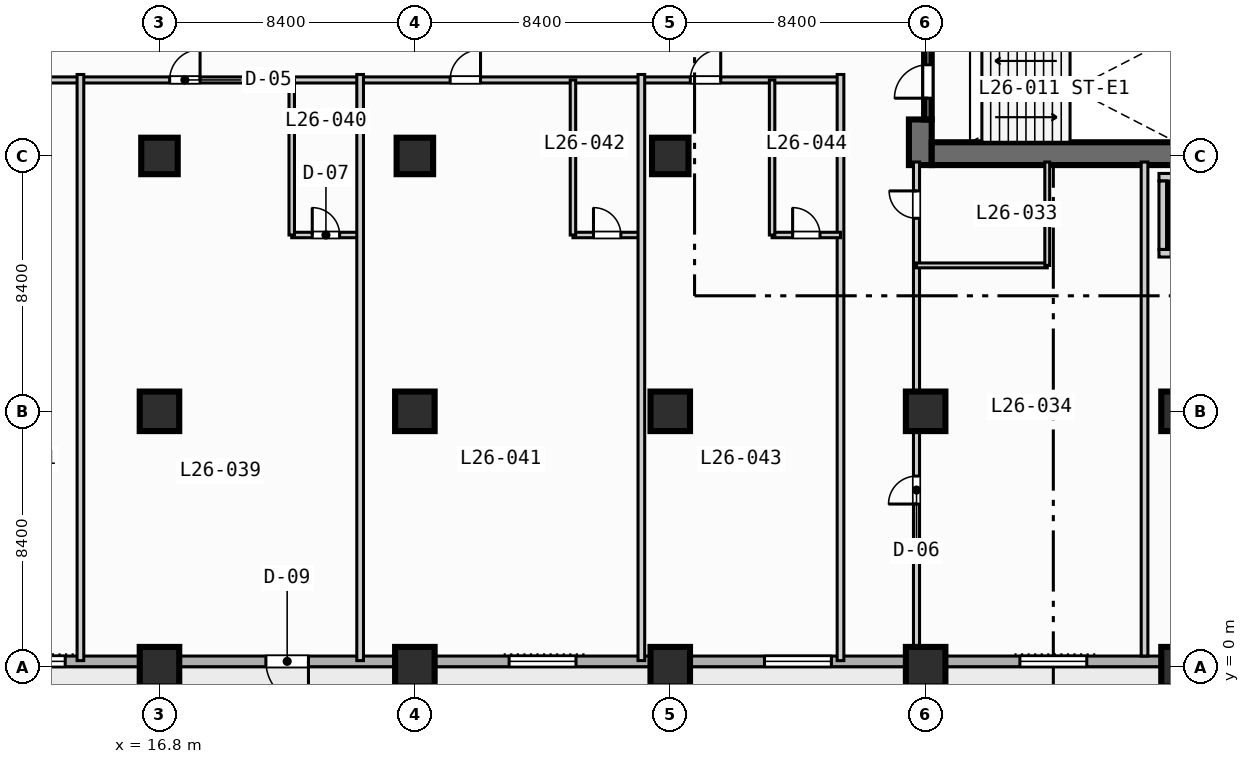
"""IFC4 building model, lengths in metres.
Left out: names, types, materials, properties, quantities, classifications, styles, units other than length and angle.
Written with IfcOpenShell. Run it as: python <this file> out.ifc"""

import sys

from ifc_helpers import new_model, si_unit, direction, frame, frame_2d, origin, origin_2d, place, context, subcontext, project, spatial, rectangle, extrude, element, fill, save


model = new_model("IFC4")
c1 = context("Model", 3, precision=1e-05, world=origin(), true_north=direction((0.0, 1.0)))
c2 = subcontext(c1, "Body", "Model", "MODEL_VIEW")
j1 = project(units=[si_unit("LENGTHUNIT", "METRE"), si_unit("PLANEANGLEUNIT", "RADIAN")], contexts=[c1])
p1 = place(None, origin())
s1 = spatial("IfcSite", under=j1, at=p1, CompositionType="ELEMENT")
p2 = place(p1, origin())
s2 = spatial("IfcBuilding", under=s1, at=p2, CompositionType="ELEMENT")
p3 = place(p2, frame((0.0, 0.0, 111.4)))
s3 = spatial("IfcBuildingStorey", under=s2, at=p3, CompositionType="ELEMENT", Elevation=111.4)
p4 = place(p3, frame((41.825, 16.5, 0.0), z_axis=(0.0, 0.0, 1.0), x_axis=(0.0, 1.0, 0.0)))
e1 = element("IfcWall", 1, at=p4, inside=s3, PredefinedType="SHEAR", context=c2, shape_type="SweptSolid", body=[
    extrude(rectangle(XDim=1.5, YDim=0.75, at=frame_2d((0.75, 0.0))), origin(), (0.0, 0.0, 1.0), 3.55),
])
p5 = place(p3, frame((42.2, 16.875, 0.0), z_axis=(0.0, 0.0, 1.0), x_axis=(1.0, 0.0, 0.0)))
e2 = element("IfcWall", 2, at=p5, inside=s3, PredefinedType="SHEAR", context=c2, shape_type="SweptSolid", body=[
    extrude(rectangle(XDim=16.35, YDim=0.75, at=frame_2d((8.175, 0.0))), origin(), (0.0, 0.0, 1.0), 3.55),
])
for number, where, z_axis, x_axis in (
    (3, (16.8, 0.0, 0.0), (0.0, 0.0, 1.0), (1.0, 0.0, 0.0)),
    (4, (16.8, 8.4, 0.0), (0.0, 0.0, 1.0), (1.0, 0.0, 0.0)),
):
    element("IfcColumn", number, at=place(p3, frame(where, z_axis=z_axis, x_axis=x_axis)), inside=s3, PredefinedType="COLUMN", context=c2, shape_type="SweptSolid", body=[
        extrude(rectangle(XDim=1.3, YDim=1.3, at=origin_2d()), origin(), (0.0, 0.0, 1.0), 3.8),
    ])
p6 = place(p3, frame((16.8, 16.8, 0.0), z_axis=(0.0, 0.0, 1.0), x_axis=(1.0, 0.0, 0.0)))
e5 = element("IfcColumn", 5, at=p6, inside=s3, PredefinedType="COLUMN", context=c2, shape_type="SweptSolid", body=[
    extrude(rectangle(XDim=1.2, YDim=1.2, at=origin_2d()), origin(), (0.0, 0.0, 1.0), 3.8),
])
for number, where, z_axis, x_axis in (
    (6, (25.2, 0.0, 0.0), (0.0, 0.0, 1.0), (1.0, 0.0, 0.0)),
    (7, (25.2, 8.4, 0.0), (0.0, 0.0, 1.0), (1.0, 0.0, 0.0)),
):
    element("IfcColumn", number, at=place(p3, frame(where, z_axis=z_axis, x_axis=x_axis)), inside=s3, PredefinedType="COLUMN", context=c2, shape_type="SweptSolid", body=[
        extrude(rectangle(XDim=1.3, YDim=1.3, at=origin_2d()), origin(), (0.0, 0.0, 1.0), 3.8),
    ])
p7 = place(p3, frame((25.2, 16.8, 0.0), z_axis=(0.0, 0.0, 1.0), x_axis=(1.0, 0.0, 0.0)))
e8 = element("IfcColumn", 8, at=p7, inside=s3, PredefinedType="COLUMN", context=c2, shape_type="SweptSolid", body=[
    extrude(rectangle(XDim=1.2, YDim=1.2, at=origin_2d()), origin(), (0.0, 0.0, 1.0), 3.8),
])
for number, where, z_axis, x_axis in (
    (9, (33.6, 0.0, 0.0), (0.0, 0.0, 1.0), (1.0, 0.0, 0.0)),
    (10, (33.6, 8.4, 0.0), (0.0, 0.0, 1.0), (1.0, 0.0, 0.0)),
):
    element("IfcColumn", number, at=place(p3, frame(where, z_axis=z_axis, x_axis=x_axis)), inside=s3, PredefinedType="COLUMN", context=c2, shape_type="SweptSolid", body=[
        extrude(rectangle(XDim=1.3, YDim=1.3, at=origin_2d()), origin(), (0.0, 0.0, 1.0), 3.8),
    ])
p8 = place(p3, frame((33.6, 16.8, 0.0), z_axis=(0.0, 0.0, 1.0), x_axis=(1.0, 0.0, 0.0)))
e11 = element("IfcColumn", 11, at=p8, inside=s3, PredefinedType="COLUMN", context=c2, shape_type="SweptSolid", body=[
    extrude(rectangle(XDim=1.2, YDim=1.2, at=origin_2d()), origin(), (0.0, 0.0, 1.0), 3.8),
])
for number, where, z_axis, x_axis in (
    (12, (42.0, 0.0, 0.0), (0.0, 0.0, 1.0), (1.0, 0.0, 0.0)),
    (13, (42.0, 8.4, 0.0), (0.0, 0.0, 1.0), (1.0, 0.0, 0.0)),
    (14, (50.4, 0.0, 0.0), (0.0, 0.0, 1.0), (1.0, 0.0, 0.0)),
    (15, (50.4, 8.4, 0.0), (0.0, 0.0, 1.0), (1.0, 0.0, 0.0)),
):
    element("IfcColumn", number, at=place(p3, frame(where, z_axis=z_axis, x_axis=x_axis)), inside=s3, PredefinedType="COLUMN", context=c2, shape_type="SweptSolid", body=[
        extrude(rectangle(XDim=1.3, YDim=1.3, at=origin_2d()), origin(), (0.0, 0.0, 1.0), 3.8),
    ])
p9 = place(p3, frame((72.425, 0.175, 0.0), z_axis=(0.0, 0.0, 1.0), x_axis=(-1.0, 0.0, 0.0)))
e16 = element("IfcWall", 16, at=p9, inside=s3, PredefinedType="STANDARD", context=c2, shape_type="SweptSolid", body=[
    extrude(rectangle(XDim=69.25, YDim=0.35, at=frame_2d((34.625, 0.0))), origin(), (0.0, 0.0, 1.0), 3.55),
])
p10 = place(p9, frame((50.725, 0.0, 0.0)))
e17 = element("IfcOpeningElement", 17, at=p10, cuts=e16, PredefinedType="OPENING", context=c2, shape_type="SweptSolid", body=[
    extrude(rectangle(XDim=1.4, YDim=2.2, at=frame_2d((0.7, 1.1))), frame((0.0, 0.185, 0.0), z_axis=(0.0, -1.0, 0.0), x_axis=(1.0, 0.0, 0.0)), (0.0, 0.0, 1.0), 0.37),
])
p11 = place(p9, frame((58.725, 0.0, 0.85)))
e18 = element("IfcOpeningElement", 18, at=p11, cuts=e16, PredefinedType="OPENING", context=c2, shape_type="SweptSolid", body=[
    extrude(rectangle(XDim=2.2, YDim=1.8, at=frame_2d((1.1, 0.9))), frame((0.0, 0.185, 0.0), z_axis=(0.0, -1.0, 0.0), x_axis=(1.0, 0.0, 0.0)), (0.0, 0.0, 1.0), 0.37),
])
p12 = place(p9, frame((41.925, 0.0, 0.85)))
e19 = element("IfcOpeningElement", 19, at=p12, cuts=e16, PredefinedType="OPENING", context=c2, shape_type="SweptSolid", body=[
    extrude(rectangle(XDim=2.2, YDim=1.8, at=frame_2d((1.1, 0.9))), frame((0.0, 0.185, 0.0), z_axis=(0.0, -1.0, 0.0), x_axis=(1.0, 0.0, 0.0)), (0.0, 0.0, 1.0), 0.37),
])
p13 = place(p9, frame((33.525, 0.0, 0.85)))
e20 = element("IfcOpeningElement", 20, at=p13, cuts=e16, PredefinedType="OPENING", context=c2, shape_type="SweptSolid", body=[
    extrude(rectangle(XDim=2.2, YDim=1.8, at=frame_2d((1.1, 0.9))), frame((0.0, 0.185, 0.0), z_axis=(0.0, -1.0, 0.0), x_axis=(1.0, 0.0, 0.0)), (0.0, 0.0, 1.0), 0.37),
])
p14 = place(p9, frame((25.125, 0.0, 0.85)))
e21 = element("IfcOpeningElement", 21, at=p14, cuts=e16, PredefinedType="OPENING", context=c2, shape_type="SweptSolid", body=[
    extrude(rectangle(XDim=2.2, YDim=1.8, at=frame_2d((1.1, 0.9))), frame((0.0, 0.185, 0.0), z_axis=(0.0, -1.0, 0.0), x_axis=(1.0, 0.0, 0.0)), (0.0, 0.0, 1.0), 0.37),
])
p15 = place(p9, frame((8.325, 0.0, 0.85)))
e22 = element("IfcOpeningElement", 22, at=p15, cuts=e16, PredefinedType="OPENING", context=c2, shape_type="SweptSolid", body=[
    extrude(rectangle(XDim=2.2, YDim=1.8, at=frame_2d((1.1, 0.9))), frame((0.0, 0.185, 0.0), z_axis=(0.0, -1.0, 0.0), x_axis=(1.0, 0.0, 0.0)), (0.0, 0.0, 1.0), 0.37),
])
p16 = place(p9, frame((2.125, 0.0, 0.85)))
e23 = element("IfcOpeningElement", 23, at=p16, cuts=e16, PredefinedType="OPENING", context=c2, shape_type="SweptSolid", body=[
    extrude(rectangle(XDim=1.8, YDim=1.8, at=frame_2d((0.9, 0.9))), frame((0.0, 0.185, 0.0), z_axis=(0.0, -1.0, 0.0), x_axis=(1.0, 0.0, 0.0)), (0.0, 0.0, 1.0), 0.37),
])
p17 = place(p3, frame((42.075, 18.0, 0.0), z_axis=(0.0, 0.0, 1.0), x_axis=(0.0, 1.0, 0.0)))
e24 = element("IfcWall", 24, at=p17, inside=s3, PredefinedType="SOLIDWALL", context=c2, shape_type="SweptSolid", body=[
    extrude(rectangle(XDim=2.5, YDim=0.25, at=frame_2d((1.25, 0.0))), origin(), (0.0, 0.0, 1.0), 3.55),
])
p18 = place(p17, frame((0.7, 0.0, 0.0)))
e25 = element("IfcOpeningElement", 25, at=p18, cuts=e24, PredefinedType="OPENING", context=c2, shape_type="SweptSolid", body=[
    extrude(rectangle(XDim=1.1, YDim=2.15, at=frame_2d((0.55, 1.075))), frame((0.0, 0.135, 0.0), z_axis=(0.0, -1.0, 0.0), x_axis=(1.0, 0.0, 0.0)), (0.0, 0.0, 1.0), 0.27),
])
p19 = place(p3, frame((49.675, 13.6, 0.0), z_axis=(0.0, 0.0, 1.0), x_axis=(1.0, 0.0, 0.0)))
e26 = element("IfcWall", 26, at=p19, inside=s3, PredefinedType="SOLIDWALL", context=c2, shape_type="SweptSolid", body=[
    extrude(rectangle(XDim=2.25, YDim=0.25, at=frame_2d((1.125, 0.0))), origin(), (0.0, 0.0, 1.0), 3.55),
])
p20 = place(p19, frame((0.4, 0.0, 0.0)))
e27 = element("IfcOpeningElement", 27, at=p20, cuts=e26, PredefinedType="OPENING", context=c2, shape_type="SweptSolid", body=[
    extrude(rectangle(XDim=1.1, YDim=2.15, at=frame_2d((0.55, 1.075))), frame((0.0, 0.135, 0.0), z_axis=(0.0, -1.0, 0.0), x_axis=(1.0, 0.0, 0.0)), (0.0, 0.0, 1.0), 0.27),
])
for number, where, z_axis, x_axis in (
    (28, (49.675, 16.1, 0.0), (0.0, 0.0, 1.0), (1.0, 0.0, 0.0)),
    (29, (49.8, 13.725, 0.0), (0.0, 0.0, 1.0), (0.0, 1.0, 0.0)),
):
    element("IfcWall", number, at=place(p3, frame(where, z_axis=z_axis, x_axis=x_axis)), inside=s3, PredefinedType="SOLIDWALL", context=c2, shape_type="SweptSolid", body=[
        extrude(rectangle(XDim=2.25, YDim=0.25, at=frame_2d((1.125, 0.0))), origin(), (0.0, 0.0, 1.0), 3.55),
    ])
p21 = place(p3, frame((41.7, 0.35, 0.0), z_axis=(0.0, 0.0, 1.0), x_axis=(0.0, 1.0, 0.0)))
e30 = element("IfcWall", 30, at=p21, inside=s3, PredefinedType="PARTITIONING", context=c2, shape_type="SweptSolid", body=[
    extrude(rectangle(XDim=16.25, YDim=0.2, at=frame_2d((8.125, 0.0))), origin(), (0.0, 0.0, 1.0), 2.8),
])
p22 = place(p21, frame((5.0, 0.0, 0.0)))
e31 = element("IfcOpeningElement", 31, at=p22, cuts=e30, PredefinedType="OPENING", context=c2, shape_type="SweptSolid", body=[
    extrude(rectangle(XDim=0.92, YDim=2.1, at=frame_2d((0.46, 1.05))), frame((0.0, 0.11, 0.0), z_axis=(0.0, -1.0, 0.0), x_axis=(1.0, 0.0, 0.0)), (0.0, 0.0, 1.0), 0.22),
])
p23 = place(p21, frame((14.4, 0.0, 0.0)))
e32 = element("IfcOpeningElement", 32, at=p23, cuts=e30, PredefinedType="OPENING", context=c2, shape_type="SweptSolid", body=[
    extrude(rectangle(XDim=0.9, YDim=2.1, at=frame_2d((0.45, 1.05))), frame((0.0, 0.11, 0.0), z_axis=(0.0, -1.0, 0.0), x_axis=(1.0, 0.0, 0.0)), (0.0, 0.0, 1.0), 0.22),
])
p24 = place(p3, frame((49.2, 0.35, 0.0), z_axis=(0.0, 0.0, 1.0), x_axis=(0.0, 1.0, 0.0)))
e33 = element("IfcWall", 33, at=p24, inside=s3, PredefinedType="PARTITIONING", context=c2, shape_type="SweptSolid", body=[
    extrude(rectangle(XDim=16.25, YDim=0.22, at=frame_2d((8.125, 0.0))), origin(), (0.0, 0.0, 1.0), 3.55),
])
p25 = place(p3, frame((41.7, 13.2, 0.0), z_axis=(0.0, 0.0, 1.0), x_axis=(1.0, 0.0, 0.0)))
e34 = element("IfcWall", 34, at=p25, inside=s3, PredefinedType="PARTITIONING", context=c2, shape_type="SweptSolid", body=[
    extrude(rectangle(XDim=4.3, YDim=0.16, at=frame_2d((2.15, 0.0))), origin(), (0.0, 0.0, 1.0), 3.55),
])
p26 = place(p3, frame((46.0, 13.2, 0.0), z_axis=(0.0, 0.0, 1.0), x_axis=(0.0, 1.0, 0.0)))
e35 = element("IfcWall", 35, at=p26, inside=s3, PredefinedType="PARTITIONING", context=c2, shape_type="SweptSolid", body=[
    extrude(rectangle(XDim=3.4, YDim=0.16, at=frame_2d((1.7, 0.0))), origin(), (0.0, 0.0, 1.0), 3.55),
])
p27 = place(p3, frame((3.4, 19.3, 0.0), z_axis=(0.0, 0.0, 1.0), x_axis=(1.0, 0.0, 0.0)))
e36 = element("IfcWall", 36, at=p27, inside=s3, PredefinedType="PARTITIONING", context=c2, shape_type="SweptSolid", body=[
    extrude(rectangle(XDim=35.8, YDim=0.2, at=frame_2d((17.9, 0.0))), origin(), (0.0, 0.0, 1.0), 3.55),
])
p28 = place(p27, frame((6.065, 0.0, 0.0)))
e37 = element("IfcOpeningElement", 37, at=p28, cuts=e36, PredefinedType="OPENING", context=c2, shape_type="SweptSolid", body=[
    extrude(rectangle(XDim=1.0, YDim=2.15, at=frame_2d((0.5, 1.075))), frame((0.0, 0.11, 0.0), z_axis=(0.0, -1.0, 0.0), x_axis=(1.0, 0.0, 0.0)), (0.0, 0.0, 1.0), 0.22),
])
p29 = place(p27, frame((13.735, 0.0, 0.0)))
e38 = element("IfcOpeningElement", 38, at=p29, cuts=e36, PredefinedType="OPENING", context=c2, shape_type="SweptSolid", body=[
    extrude(rectangle(XDim=1.0, YDim=2.15, at=frame_2d((0.5, 1.075))), frame((0.0, 0.11, 0.0), z_axis=(0.0, -1.0, 0.0), x_axis=(1.0, 0.0, 0.0)), (0.0, 0.0, 1.0), 0.22),
])
p30 = place(p27, frame((22.96, 0.0, 0.0)))
e39 = element("IfcOpeningElement", 39, at=p30, cuts=e36, PredefinedType="OPENING", context=c2, shape_type="SweptSolid", body=[
    extrude(rectangle(XDim=1.0, YDim=2.15, at=frame_2d((0.5, 1.075))), frame((0.0, 0.11, 0.0), z_axis=(0.0, -1.0, 0.0), x_axis=(1.0, 0.0, 0.0)), (0.0, 0.0, 1.0), 0.22),
])
p31 = place(p27, frame((30.86, 0.0, 0.0)))
e40 = element("IfcOpeningElement", 40, at=p31, cuts=e36, PredefinedType="OPENING", context=c2, shape_type="SweptSolid", body=[
    extrude(rectangle(XDim=1.0, YDim=2.15, at=frame_2d((0.5, 1.075))), frame((0.0, 0.11, 0.0), z_axis=(0.0, -1.0, 0.0), x_axis=(1.0, 0.0, 0.0)), (0.0, 0.0, 1.0), 0.22),
])
p32 = place(p3, frame((14.2, 0.2, 0.0), z_axis=(0.0, 0.0, 1.0), x_axis=(0.0, 1.0, 0.0)))
e41 = element("IfcWall", 41, at=p32, inside=s3, PredefinedType="PARTITIONING", context=c2, shape_type="SweptSolid", body=[
    extrude(rectangle(XDim=19.28, YDim=0.22, at=frame_2d((9.64, 0.0))), origin(), (0.0, 0.0, 1.0), 3.55),
])
p33 = place(p3, frame((21.15, 14.2, 0.0), z_axis=(0.0, 0.0, 1.0), x_axis=(1.0, 0.0, 0.0)))
e42 = element("IfcWall", 42, at=p33, inside=s3, PredefinedType="PLUMBINGWALL", context=c2, shape_type="SweptSolid", body=[
    extrude(rectangle(XDim=2.25, YDim=0.18, at=frame_2d((1.125, 0.0))), origin(), (0.0, 0.0, 1.0), 3.55),
])
p34 = place(p33, frame((0.675, 0.0, 0.0)))
e43 = element("IfcOpeningElement", 43, at=p34, cuts=e42, PredefinedType="OPENING", context=c2, shape_type="SweptSolid", body=[
    extrude(rectangle(XDim=0.9, YDim=2.1, at=frame_2d((0.45, 1.05))), frame((0.0, 0.1, 0.0), z_axis=(0.0, -1.0, 0.0), x_axis=(1.0, 0.0, 0.0)), (0.0, 0.0, 1.0), 0.2),
])
p35 = place(p3, frame((21.15, 14.2, 0.0), z_axis=(0.0, 0.0, 1.0), x_axis=(0.0, 1.0, 0.0)))
e44 = element("IfcWall", 44, at=p35, inside=s3, PredefinedType="PLUMBINGWALL", context=c2, shape_type="SweptSolid", body=[
    extrude(rectangle(XDim=5.1, YDim=0.18, at=frame_2d((2.55, 0.0))), origin(), (0.0, 0.0, 1.0), 3.55),
])
p36 = place(p3, frame((23.4, 0.2, 0.0), z_axis=(0.0, 0.0, 1.0), x_axis=(0.0, 1.0, 0.0)))
e45 = element("IfcWall", 45, at=p36, inside=s3, PredefinedType="PARTITIONING", context=c2, shape_type="SweptSolid", body=[
    extrude(rectangle(XDim=19.28, YDim=0.22, at=frame_2d((9.64, 0.0))), origin(), (0.0, 0.0, 1.0), 3.55),
])
p37 = place(p3, frame((30.4, 14.2, 0.0), z_axis=(0.0, 0.0, 1.0), x_axis=(1.0, 0.0, 0.0)))
e46 = element("IfcWall", 46, at=p37, inside=s3, PredefinedType="PLUMBINGWALL", context=c2, shape_type="SweptSolid", body=[
    extrude(rectangle(XDim=2.25, YDim=0.18, at=frame_2d((1.125, 0.0))), origin(), (0.0, 0.0, 1.0), 3.55),
])
p38 = place(p37, frame((0.675, 0.0, 0.0)))
e47 = element("IfcOpeningElement", 47, at=p38, cuts=e46, PredefinedType="OPENING", context=c2, shape_type="SweptSolid", body=[
    extrude(rectangle(XDim=0.9, YDim=2.1, at=frame_2d((0.45, 1.05))), frame((0.0, 0.1, 0.0), z_axis=(0.0, -1.0, 0.0), x_axis=(1.0, 0.0, 0.0)), (0.0, 0.0, 1.0), 0.2),
])
p39 = place(p3, frame((30.4, 14.2, 0.0), z_axis=(0.0, 0.0, 1.0), x_axis=(0.0, 1.0, 0.0)))
e48 = element("IfcWall", 48, at=p39, inside=s3, PredefinedType="PLUMBINGWALL", context=c2, shape_type="SweptSolid", body=[
    extrude(rectangle(XDim=5.1, YDim=0.18, at=frame_2d((2.55, 0.0))), origin(), (0.0, 0.0, 1.0), 3.55),
])
for number, where, z_axis, x_axis in (
    (49, (32.65, 0.2, 0.0), (0.0, 0.0, 1.0), (0.0, 1.0, 0.0)),
    (50, (39.2, 0.2, 0.0), (0.0, 0.0, 1.0), (0.0, 1.0, 0.0)),
):
    element("IfcWall", number, at=place(p3, frame(where, z_axis=z_axis, x_axis=x_axis)), inside=s3, PredefinedType="PARTITIONING", context=c2, shape_type="SweptSolid", body=[
        extrude(rectangle(XDim=19.28, YDim=0.22, at=frame_2d((9.64, 0.0))), origin(), (0.0, 0.0, 1.0), 3.55),
    ])
p40 = place(p3, frame((36.95, 14.2, 0.0), z_axis=(0.0, 0.0, 1.0), x_axis=(1.0, 0.0, 0.0)))
e51 = element("IfcWall", 51, at=p40, inside=s3, PredefinedType="PLUMBINGWALL", context=c2, shape_type="SweptSolid", body=[
    extrude(rectangle(XDim=2.25, YDim=0.18, at=frame_2d((1.125, 0.0))), origin(), (0.0, 0.0, 1.0), 3.55),
])
p41 = place(p40, frame((0.675, 0.0, 0.0)))
e52 = element("IfcOpeningElement", 52, at=p41, cuts=e51, PredefinedType="OPENING", context=c2, shape_type="SweptSolid", body=[
    extrude(rectangle(XDim=0.9, YDim=2.1, at=frame_2d((0.45, 1.05))), frame((0.0, 0.1, 0.0), z_axis=(0.0, -1.0, 0.0), x_axis=(1.0, 0.0, 0.0)), (0.0, 0.0, 1.0), 0.2),
])
p42 = place(p3, frame((36.95, 14.2, 0.0), z_axis=(0.0, 0.0, 1.0), x_axis=(0.0, 1.0, 0.0)))
e53 = element("IfcWall", 53, at=p42, inside=s3, PredefinedType="PLUMBINGWALL", context=c2, shape_type="SweptSolid", body=[
    extrude(rectangle(XDim=5.1, YDim=0.18, at=frame_2d((2.55, 0.0))), origin(), (0.0, 0.0, 1.0), 3.55),
])
p43 = place(p10, origin())
e54 = element("IfcDoor", 54, at=p43, inside=s3, OperationType="SINGLE_SWING_LEFT", PredefinedType="DOOR", context=c2, shape_type="SweptSolid", body=[
    extrude(rectangle(XDim=1.4, YDim=2.2, at=frame_2d((0.7, 1.1))), frame((0.0, 0.025, 0.0), z_axis=(0.0, -1.0, 0.0), x_axis=(1.0, 0.0, 0.0)), (0.0, 0.0, 1.0), 0.05),
])
fill(e17, e54)
p44 = place(p11, origin())
e55 = element("IfcWindow", 55, at=p44, inside=s3, PartitioningType="SINGLE_PANEL", PredefinedType="WINDOW", context=c2, shape_type="SweptSolid", body=[
    extrude(rectangle(XDim=2.2, YDim=1.8, at=frame_2d((1.1, 0.9))), frame((0.0, 0.03, 0.0), z_axis=(0.0, -1.0, 0.0), x_axis=(1.0, 0.0, 0.0)), (0.0, 0.0, 1.0), 0.06),
])
fill(e18, e55)
p45 = place(p12, origin())
e56 = element("IfcWindow", 56, at=p45, inside=s3, PartitioningType="SINGLE_PANEL", PredefinedType="WINDOW", context=c2, shape_type="SweptSolid", body=[
    extrude(rectangle(XDim=2.2, YDim=1.8, at=frame_2d((1.1, 0.9))), frame((0.0, 0.03, 0.0), z_axis=(0.0, -1.0, 0.0), x_axis=(1.0, 0.0, 0.0)), (0.0, 0.0, 1.0), 0.06),
])
fill(e19, e56)
p46 = place(p13, origin())
e57 = element("IfcWindow", 57, at=p46, inside=s3, PartitioningType="SINGLE_PANEL", PredefinedType="WINDOW", context=c2, shape_type="SweptSolid", body=[
    extrude(rectangle(XDim=2.2, YDim=1.8, at=frame_2d((1.1, 0.9))), frame((0.0, 0.03, 0.0), z_axis=(0.0, -1.0, 0.0), x_axis=(1.0, 0.0, 0.0)), (0.0, 0.0, 1.0), 0.06),
])
fill(e20, e57)
p47 = place(p14, origin())
e58 = element("IfcWindow", 58, at=p47, inside=s3, PartitioningType="SINGLE_PANEL", PredefinedType="WINDOW", context=c2, shape_type="SweptSolid", body=[
    extrude(rectangle(XDim=2.2, YDim=1.8, at=frame_2d((1.1, 0.9))), frame((0.0, 0.03, 0.0), z_axis=(0.0, -1.0, 0.0), x_axis=(1.0, 0.0, 0.0)), (0.0, 0.0, 1.0), 0.06),
])
fill(e21, e58)
p48 = place(p18, origin())
e59 = element("IfcDoor", 59, at=p48, inside=s3, OperationType="SINGLE_SWING_LEFT", PredefinedType="DOOR", context=c2, shape_type="SweptSolid", body=[
    extrude(rectangle(XDim=1.1, YDim=2.15, at=frame_2d((0.55, 1.075))), frame((0.0, 0.025, 0.0), z_axis=(0.0, -1.0, 0.0), x_axis=(1.0, 0.0, 0.0)), (0.0, 0.0, 1.0), 0.05),
])
fill(e25, e59)
p49 = place(p22, origin())
e60 = element("IfcDoor", 60, at=p49, inside=s3, OperationType="SINGLE_SWING_LEFT", PredefinedType="DOOR", context=c2, shape_type="SweptSolid", body=[
    extrude(rectangle(XDim=0.92, YDim=2.1, at=frame_2d((0.46, 1.05))), frame((0.0, 0.025, 0.0), z_axis=(0.0, -1.0, 0.0), x_axis=(1.0, 0.0, 0.0)), (0.0, 0.0, 1.0), 0.05),
])
fill(e31, e60)
p50 = place(p23, origin())
e61 = element("IfcDoor", 61, at=p50, inside=s3, OperationType="SINGLE_SWING_RIGHT", PredefinedType="DOOR", context=c2, shape_type="SweptSolid", body=[
    extrude(rectangle(XDim=0.9, YDim=2.1, at=frame_2d((0.45, 1.05))), frame((0.0, 0.025, 0.0), z_axis=(0.0, -1.0, 0.0), x_axis=(1.0, 0.0, 0.0)), (0.0, 0.0, 1.0), 0.05),
])
fill(e32, e61)
p51 = place(p29, origin())
e62 = element("IfcDoor", 62, at=p51, inside=s3, OperationType="SINGLE_SWING_RIGHT", PredefinedType="DOOR", context=c2, shape_type="SweptSolid", body=[
    extrude(rectangle(XDim=1.0, YDim=2.15, at=frame_2d((0.5, 1.075))), frame((0.0, 0.025, 0.0), z_axis=(0.0, -1.0, 0.0), x_axis=(1.0, 0.0, 0.0)), (0.0, 0.0, 1.0), 0.05),
])
fill(e38, e62)
p52 = place(p30, origin())
e63 = element("IfcDoor", 63, at=p52, inside=s3, OperationType="SINGLE_SWING_RIGHT", PredefinedType="DOOR", context=c2, shape_type="SweptSolid", body=[
    extrude(rectangle(XDim=1.0, YDim=2.15, at=frame_2d((0.5, 1.075))), frame((0.0, 0.025, 0.0), z_axis=(0.0, -1.0, 0.0), x_axis=(1.0, 0.0, 0.0)), (0.0, 0.0, 1.0), 0.05),
])
fill(e39, e63)
p53 = place(p31, origin())
e64 = element("IfcDoor", 64, at=p53, inside=s3, OperationType="SINGLE_SWING_RIGHT", PredefinedType="DOOR", context=c2, shape_type="SweptSolid", body=[
    extrude(rectangle(XDim=1.0, YDim=2.15, at=frame_2d((0.5, 1.075))), frame((0.0, 0.025, 0.0), z_axis=(0.0, -1.0, 0.0), x_axis=(1.0, 0.0, 0.0)), (0.0, 0.0, 1.0), 0.05),
])
fill(e40, e64)
p54 = place(p34, origin())
e65 = element("IfcDoor", 65, at=p54, inside=s3, OperationType="SINGLE_SWING_LEFT", PredefinedType="DOOR", context=c2, shape_type="SweptSolid", body=[
    extrude(rectangle(XDim=0.9, YDim=2.1, at=frame_2d((0.45, 1.05))), frame((0.0, 0.025, 0.0), z_axis=(0.0, -1.0, 0.0), x_axis=(1.0, 0.0, 0.0)), (0.0, 0.0, 1.0), 0.05),
])
fill(e43, e65)
p55 = place(p38, origin())
e66 = element("IfcDoor", 66, at=p55, inside=s3, OperationType="SINGLE_SWING_LEFT", PredefinedType="DOOR", context=c2, shape_type="SweptSolid", body=[
    extrude(rectangle(XDim=0.9, YDim=2.1, at=frame_2d((0.45, 1.05))), frame((0.0, 0.025, 0.0), z_axis=(0.0, -1.0, 0.0), x_axis=(1.0, 0.0, 0.0)), (0.0, 0.0, 1.0), 0.05),
])
fill(e47, e66)
p56 = place(p41, origin())
e67 = element("IfcDoor", 67, at=p56, inside=s3, OperationType="SINGLE_SWING_LEFT", PredefinedType="DOOR", context=c2, shape_type="SweptSolid", body=[
    extrude(rectangle(XDim=0.9, YDim=2.1, at=frame_2d((0.45, 1.05))), frame((0.0, 0.025, 0.0), z_axis=(0.0, -1.0, 0.0), x_axis=(1.0, 0.0, 0.0)), (0.0, 0.0, 1.0), 0.05),
])
fill(e52, e67)
save(model, sys.argv[1])
